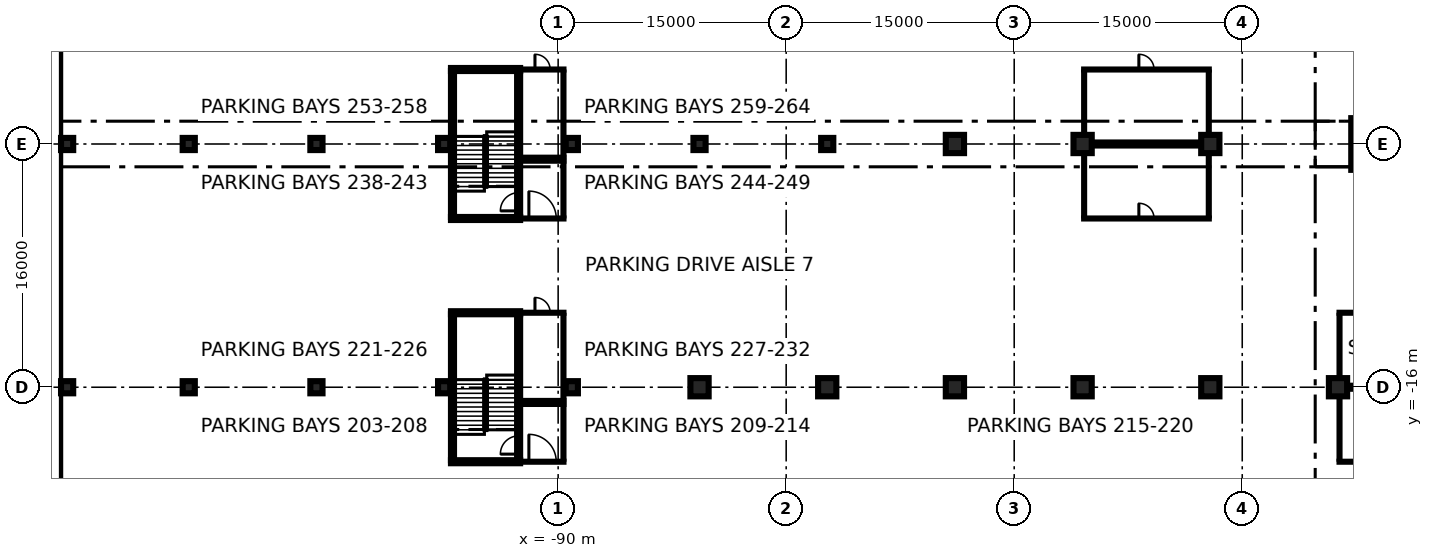
"""IFC4 building model, lengths in metres.
Left out: names, types, materials, properties, quantities, classifications, styles, units other than length and angle.
Written with IfcOpenShell. Run it as: python <this file> out.ifc"""

import sys

from ifc_helpers import new_model, si_unit, direction, frame, frame_2d, origin, origin_2d, place, context, subcontext, project, spatial, rectangle, extrude, element, fill, save


model = new_model("IFC4")
c1 = context("Model", 3, precision=1e-05, world=origin(), true_north=direction((0.0, 1.0)))
c2 = subcontext(c1, "Body", "Model", "MODEL_VIEW")
j1 = project(units=[si_unit("LENGTHUNIT", "METRE"), si_unit("PLANEANGLEUNIT", "RADIAN")], contexts=[c1])
p1 = place(None, origin())
s1 = spatial("IfcSite", under=j1, at=p1, CompositionType="ELEMENT")
p2 = place(p1, origin())
s2 = spatial("IfcBuilding", under=s1, at=p2, CompositionType="ELEMENT")
p3 = place(p2, frame((0.0, 0.0, -12.0)))
s3 = spatial("IfcBuildingStorey", under=s2, at=p3, CompositionType="ELEMENT", Elevation=-12.0)
p4 = place(p3, frame((-123.15, -80.0, 0.0), z_axis=(0.0, 0.0, 1.0), x_axis=(0.0, 1.0, 0.0)))
e1 = element("IfcWall", 1, at=p4, inside=s3, PredefinedType="USERDEFINED", context=c2, shape_type="SweptSolid", body=[
    extrude(rectangle(XDim=160.0, YDim=0.9, at=frame_2d((80.0, 0.0))), origin(), (0.0, 0.0, 1.0), 11.55),
])
p5 = place(p2, frame((0.0, 0.0, -3.6)))
s4 = spatial("IfcBuildingStorey", under=s2, at=p5, CompositionType="ELEMENT", Elevation=-3.6)
p6 = place(p5, frame((-35.729, 0.0, -0.4), z_axis=(0.0, 0.0, 1.0), x_axis=(1.0, 0.0, 0.0)))
e2 = element("IfcColumn", 2, at=p6, inside=s4, PredefinedType="COLUMN", context=c2, shape_type="SweptSolid", body=[
    extrude(rectangle(XDim=4.2, YDim=3.4, at=origin_2d()), origin(), (0.0, 0.0, 1.0), 3.55),
])
for number, where, z_axis, x_axis in (
    (3, (-122.3, -16.0, -0.4), (0.0, 0.0, 1.0), (1.0, 0.0, 0.0)),
    (4, (-122.3, 0.0, -0.4), (0.0, 0.0, 1.0), (1.0, 0.0, 0.0)),
    (5, (-114.3, -16.0, -0.4), (0.0, 0.0, 1.0), (1.0, 0.0, 0.0)),
    (6, (-114.3, 0.0, -0.4), (0.0, 0.0, 1.0), (1.0, 0.0, 0.0)),
    (7, (-105.9, -16.0, -0.4), (0.0, 0.0, 1.0), (1.0, 0.0, 0.0)),
    (8, (-105.9, 0.0, -0.4), (0.0, 0.0, 1.0), (1.0, 0.0, 0.0)),
    (9, (-97.5, -16.0, -0.4), (0.0, 0.0, 1.0), (1.0, 0.0, 0.0)),
    (10, (-97.5, 0.0, -0.4), (0.0, 0.0, 1.0), (1.0, 0.0, 0.0)),
    (11, (-89.1, -16.0, -0.4), (0.0, 0.0, 1.0), (1.0, 0.0, 0.0)),
    (12, (-89.1, 0.0, -0.4), (0.0, 0.0, 1.0), (1.0, 0.0, 0.0)),
):
    element("IfcColumn", number, at=place(p5, frame(where, z_axis=z_axis, x_axis=x_axis)), inside=s4, PredefinedType="COLUMN", context=c2, shape_type="SweptSolid", body=[
        extrude(rectangle(XDim=0.8, YDim=0.8, at=origin_2d()), origin(), (0.0, 0.0, 1.0), 3.55),
    ])
p7 = place(p5, frame((-80.7, -16.0, -0.4), z_axis=(0.0, 0.0, 1.0), x_axis=(1.0, 0.0, 0.0)))
e13 = element("IfcColumn", 13, at=p7, inside=s4, PredefinedType="COLUMN", context=c2, shape_type="SweptSolid", body=[
    extrude(rectangle(XDim=1.2, YDim=1.2, at=origin_2d()), origin(), (0.0, 0.0, 1.0), 3.55),
])
p8 = place(p5, frame((-80.7, 0.0, -0.4), z_axis=(0.0, 0.0, 1.0), x_axis=(1.0, 0.0, 0.0)))
e14 = element("IfcColumn", 14, at=p8, inside=s4, PredefinedType="COLUMN", context=c2, shape_type="SweptSolid", body=[
    extrude(rectangle(XDim=0.8, YDim=0.8, at=origin_2d()), origin(), (0.0, 0.0, 1.0), 3.55),
])
p9 = place(p5, frame((-72.3, -16.0, -0.4), z_axis=(0.0, 0.0, 1.0), x_axis=(1.0, 0.0, 0.0)))
e15 = element("IfcColumn", 15, at=p9, inside=s4, PredefinedType="COLUMN", context=c2, shape_type="SweptSolid", body=[
    extrude(rectangle(XDim=1.2, YDim=1.2, at=origin_2d()), origin(), (0.0, 0.0, 1.0), 3.55),
])
p10 = place(p5, frame((-72.3, 0.0, -0.4), z_axis=(0.0, 0.0, 1.0), x_axis=(1.0, 0.0, 0.0)))
e16 = element("IfcColumn", 16, at=p10, inside=s4, PredefinedType="COLUMN", context=c2, shape_type="SweptSolid", body=[
    extrude(rectangle(XDim=0.8, YDim=0.8, at=origin_2d()), origin(), (0.0, 0.0, 1.0), 3.55),
])
for number, where, z_axis, x_axis in (
    (17, (-63.9, -16.0, -0.4), (0.0, 0.0, 1.0), (1.0, 0.0, 0.0)),
    (18, (-63.9, 0.0, -0.4), (0.0, 0.0, 1.0), (1.0, 0.0, 0.0)),
    (19, (-55.5, -16.0, -0.4), (0.0, 0.0, 1.0), (1.0, 0.0, 0.0)),
    (20, (-55.5, 0.0, -0.4), (0.0, 0.0, 1.0), (1.0, 0.0, 0.0)),
    (21, (-47.1, -16.0, -0.4), (0.0, 0.0, 1.0), (1.0, 0.0, 0.0)),
    (22, (-47.1, 0.0, -0.4), (0.0, 0.0, 1.0), (1.0, 0.0, 0.0)),
    (23, (-38.7, -16.0, -0.4), (0.0, 0.0, 1.0), (1.0, 0.0, 0.0)),
):
    element("IfcColumn", number, at=place(p5, frame(where, z_axis=z_axis, x_axis=x_axis)), inside=s4, PredefinedType="COLUMN", context=c2, shape_type="SweptSolid", body=[
        extrude(rectangle(XDim=1.2, YDim=1.2, at=origin_2d()), origin(), (0.0, 0.0, 1.0), 3.55),
    ])
p11 = place(p5, frame((-38.7, -20.9, 0.0), z_axis=(0.0, 0.0, 1.0), x_axis=(1.0, 0.0, 0.0)))
e24 = element("IfcWall", 24, at=p11, inside=s4, PredefinedType="PARTITIONING", context=c2, shape_type="SweptSolid", body=[
    extrude(rectangle(XDim=33.6, YDim=0.2, at=frame_2d((16.8, 0.0))), origin(), (0.0, 0.0, 1.0), 3.15),
])
p12 = place(p11, frame((15.9, 0.0, 0.0)))
e25 = element("IfcOpeningElement", 25, at=p12, cuts=e24, PredefinedType="OPENING", context=c2, shape_type="SweptSolid", body=[
    extrude(rectangle(XDim=1.8, YDim=2.1, at=frame_2d((0.9, 1.05))), frame((0.0, 0.11, 0.0), z_axis=(0.0, -1.0, 0.0), x_axis=(1.0, 0.0, 0.0)), (0.0, 0.0, 1.0), 0.22),
])
p13 = place(p5, frame((-38.7, -16.1, 0.0), z_axis=(0.0, 0.0, 1.0), x_axis=(1.0, 0.0, 0.0)))
e26 = element("IfcWall", 26, at=p13, inside=s4, PredefinedType="PARTITIONING", context=c2, shape_type="SweptSolid", body=[
    extrude(rectangle(XDim=33.6, YDim=0.2, at=frame_2d((16.8, 0.0))), origin(), (0.0, 0.0, 1.0), 3.15),
])
p14 = place(p5, frame((-38.6, -20.8, 0.0), z_axis=(0.0, 0.0, 1.0), x_axis=(0.0, 1.0, 0.0)))
e27 = element("IfcWall", 27, at=p14, inside=s4, PredefinedType="PARTITIONING", context=c2, shape_type="SweptSolid", body=[
    extrude(rectangle(XDim=4.2, YDim=0.2, at=frame_2d((2.1, 0.0))), origin(), (0.0, 0.0, 1.0), 3.15),
])
p15 = place(p5, frame((-38.7, -15.9, 0.0), z_axis=(0.0, 0.0, 1.0), x_axis=(1.0, 0.0, 0.0)))
e28 = element("IfcWall", 28, at=p15, inside=s4, PredefinedType="PARTITIONING", context=c2, shape_type="SweptSolid", body=[
    extrude(rectangle(XDim=16.8, YDim=0.2, at=frame_2d((8.4, 0.0))), origin(), (0.0, 0.0, 1.0), 3.15),
])
p16 = place(p5, frame((-38.7, -11.1, 0.0), z_axis=(0.0, 0.0, 1.0), x_axis=(1.0, 0.0, 0.0)))
e29 = element("IfcWall", 29, at=p16, inside=s4, PredefinedType="PARTITIONING", context=c2, shape_type="SweptSolid", body=[
    extrude(rectangle(XDim=16.8, YDim=0.2, at=frame_2d((8.4, 0.0))), origin(), (0.0, 0.0, 1.0), 3.15),
])
p17 = place(p16, frame((7.9, 0.0, 0.0)))
e30 = element("IfcOpeningElement", 30, at=p17, cuts=e29, PredefinedType="OPENING", context=c2, shape_type="SweptSolid", body=[
    extrude(rectangle(XDim=1.0, YDim=2.1, at=frame_2d((0.5, 1.05))), frame((0.0, 0.11, 0.0), z_axis=(0.0, -1.0, 0.0), x_axis=(1.0, 0.0, 0.0)), (0.0, 0.0, 1.0), 0.22),
])
p18 = place(p5, frame((-38.6, -15.4, 0.0), z_axis=(0.0, 0.0, 1.0), x_axis=(0.0, 1.0, 0.0)))
e31 = element("IfcWall", 31, at=p18, inside=s4, PredefinedType="PARTITIONING", context=c2, shape_type="SweptSolid", body=[
    extrude(rectangle(XDim=4.2, YDim=0.2, at=frame_2d((2.1, 0.0))), origin(), (0.0, 0.0, 1.0), 3.15),
])
p19 = place(p5, frame((-55.5, -4.9, 0.0), z_axis=(0.0, 0.0, 1.0), x_axis=(1.0, 0.0, 0.0)))
e32 = element("IfcWall", 32, at=p19, inside=s4, PredefinedType="PARTITIONING", context=c2, shape_type="SweptSolid", body=[
    extrude(rectangle(XDim=8.4, YDim=0.2, at=frame_2d((4.2, 0.0))), origin(), (0.0, 0.0, 1.0), 3.15),
])
p20 = place(p19, frame((3.7, 0.0, 0.0)))
e33 = element("IfcOpeningElement", 33, at=p20, cuts=e32, PredefinedType="OPENING", context=c2, shape_type="SweptSolid", body=[
    extrude(rectangle(XDim=1.0, YDim=2.1, at=frame_2d((0.5, 1.05))), frame((0.0, 0.11, 0.0), z_axis=(0.0, -1.0, 0.0), x_axis=(1.0, 0.0, 0.0)), (0.0, 0.0, 1.0), 0.22),
])
p21 = place(p5, frame((-55.5, -0.1, 0.0), z_axis=(0.0, 0.0, 1.0), x_axis=(1.0, 0.0, 0.0)))
e34 = element("IfcWall", 34, at=p21, inside=s4, PredefinedType="PARTITIONING", context=c2, shape_type="SweptSolid", body=[
    extrude(rectangle(XDim=8.4, YDim=0.2, at=frame_2d((4.2, 0.0))), origin(), (0.0, 0.0, 1.0), 3.15),
])
for number, where, z_axis, x_axis in (
    (35, (-55.4, -4.8, 0.0), (0.0, 0.0, 1.0), (0.0, 1.0, 0.0)),
    (36, (-47.2, -4.8, 0.0), (0.0, 0.0, 1.0), (0.0, 1.0, 0.0)),
):
    element("IfcWall", number, at=place(p5, frame(where, z_axis=z_axis, x_axis=x_axis)), inside=s4, PredefinedType="PARTITIONING", context=c2, shape_type="SweptSolid", body=[
        extrude(rectangle(XDim=4.2, YDim=0.2, at=frame_2d((2.1, 0.0))), origin(), (0.0, 0.0, 1.0), 3.15),
    ])
p22 = place(p5, frame((-55.5, 0.1, 0.0), z_axis=(0.0, 0.0, 1.0), x_axis=(1.0, 0.0, 0.0)))
e37 = element("IfcWall", 37, at=p22, inside=s4, PredefinedType="PARTITIONING", context=c2, shape_type="SweptSolid", body=[
    extrude(rectangle(XDim=8.4, YDim=0.2, at=frame_2d((4.2, 0.0))), origin(), (0.0, 0.0, 1.0), 3.15),
])
p23 = place(p5, frame((-55.5, 4.9, 0.0), z_axis=(0.0, 0.0, 1.0), x_axis=(1.0, 0.0, 0.0)))
e38 = element("IfcWall", 38, at=p23, inside=s4, PredefinedType="PARTITIONING", context=c2, shape_type="SweptSolid", body=[
    extrude(rectangle(XDim=8.4, YDim=0.2, at=frame_2d((4.2, 0.0))), origin(), (0.0, 0.0, 1.0), 3.15),
])
p24 = place(p23, frame((3.7, 0.0, 0.0)))
e39 = element("IfcOpeningElement", 39, at=p24, cuts=e38, PredefinedType="OPENING", context=c2, shape_type="SweptSolid", body=[
    extrude(rectangle(XDim=1.0, YDim=2.1, at=frame_2d((0.5, 1.05))), frame((0.0, 0.11, 0.0), z_axis=(0.0, -1.0, 0.0), x_axis=(1.0, 0.0, 0.0)), (0.0, 0.0, 1.0), 0.22),
])
for number, where, z_axis, x_axis in (
    (40, (-55.4, 0.6, 0.0), (0.0, 0.0, 1.0), (0.0, 1.0, 0.0)),
    (41, (-47.2, 0.6, 0.0), (0.0, 0.0, 1.0), (0.0, 1.0, 0.0)),
):
    element("IfcWall", number, at=place(p5, frame(where, z_axis=z_axis, x_axis=x_axis)), inside=s4, PredefinedType="PARTITIONING", context=c2, shape_type="SweptSolid", body=[
        extrude(rectangle(XDim=4.2, YDim=0.2, at=frame_2d((2.1, 0.0))), origin(), (0.0, 0.0, 1.0), 3.15),
    ])
p25 = place(p5, frame((-92.5, -20.9, 0.0), z_axis=(0.0, 0.0, 1.0), x_axis=(1.0, 0.0, 0.0)))
e42 = element("IfcWall", 42, at=p25, inside=s4, PredefinedType="PARTITIONING", context=c2, shape_type="SweptSolid", body=[
    extrude(rectangle(XDim=2.95, YDim=0.2, at=frame_2d((1.475, 0.0))), origin(), (0.0, 0.0, 1.0), 3.15),
])
p26 = place(p25, frame((0.575, 0.0, 0.0)))
e43 = element("IfcOpeningElement", 43, at=p26, cuts=e42, PredefinedType="OPENING", context=c2, shape_type="SweptSolid", body=[
    extrude(rectangle(XDim=1.8, YDim=2.1, at=frame_2d((0.9, 1.05))), frame((0.0, 0.11, 0.0), z_axis=(0.0, -1.0, 0.0), x_axis=(1.0, 0.0, 0.0)), (0.0, 0.0, 1.0), 0.22),
])
p27 = place(p5, frame((-92.5, -17.1, 0.0), z_axis=(0.0, 0.0, 1.0), x_axis=(1.0, 0.0, 0.0)))
e44 = element("IfcWall", 44, at=p27, inside=s4, PredefinedType="PARTITIONING", context=c2, shape_type="SweptSolid", body=[
    extrude(rectangle(XDim=2.95, YDim=0.2, at=frame_2d((1.475, 0.0))), origin(), (0.0, 0.0, 1.0), 3.15),
])
p28 = place(p5, frame((-89.65, -20.8, 0.0), z_axis=(0.0, 0.0, 1.0), x_axis=(0.0, 1.0, 0.0)))
e45 = element("IfcWall", 45, at=p28, inside=s4, PredefinedType="PARTITIONING", context=c2, shape_type="SweptSolid", body=[
    extrude(rectangle(XDim=3.6, YDim=0.2, at=frame_2d((1.8, 0.0))), origin(), (0.0, 0.0, 1.0), 3.15),
])
p29 = place(p5, frame((-92.5, -16.9, 0.0), z_axis=(0.0, 0.0, 1.0), x_axis=(1.0, 0.0, 0.0)))
e46 = element("IfcWall", 46, at=p29, inside=s4, PredefinedType="PARTITIONING", context=c2, shape_type="SweptSolid", body=[
    extrude(rectangle(XDim=2.95, YDim=0.2, at=frame_2d((1.475, 0.0))), origin(), (0.0, 0.0, 1.0), 3.15),
])
p30 = place(p5, frame((-92.5, -11.1, 0.0), z_axis=(0.0, 0.0, 1.0), x_axis=(1.0, 0.0, 0.0)))
e47 = element("IfcWall", 47, at=p30, inside=s4, PredefinedType="PARTITIONING", context=c2, shape_type="SweptSolid", body=[
    extrude(rectangle(XDim=2.95, YDim=0.2, at=frame_2d((1.475, 0.0))), origin(), (0.0, 0.0, 1.0), 3.15),
])
p31 = place(p30, frame((0.975, 0.0, 0.0)))
e48 = element("IfcOpeningElement", 48, at=p31, cuts=e47, PredefinedType="OPENING", context=c2, shape_type="SweptSolid", body=[
    extrude(rectangle(XDim=1.0, YDim=2.1, at=frame_2d((0.5, 1.05))), frame((0.0, 0.11, 0.0), z_axis=(0.0, -1.0, 0.0), x_axis=(1.0, 0.0, 0.0)), (0.0, 0.0, 1.0), 0.22),
])
p32 = place(p5, frame((-89.65, -16.8, 0.0), z_axis=(0.0, 0.0, 1.0), x_axis=(0.0, 1.0, 0.0)))
e49 = element("IfcWall", 49, at=p32, inside=s4, PredefinedType="PARTITIONING", context=c2, shape_type="SweptSolid", body=[
    extrude(rectangle(XDim=5.6, YDim=0.2, at=frame_2d((2.8, 0.0))), origin(), (0.0, 0.0, 1.0), 3.15),
])
p33 = place(p5, frame((-92.5, -4.9, 0.0), z_axis=(0.0, 0.0, 1.0), x_axis=(1.0, 0.0, 0.0)))
e50 = element("IfcWall", 50, at=p33, inside=s4, PredefinedType="PARTITIONING", context=c2, shape_type="SweptSolid", body=[
    extrude(rectangle(XDim=2.95, YDim=0.2, at=frame_2d((1.475, 0.0))), origin(), (0.0, 0.0, 1.0), 3.15),
])
p34 = place(p33, frame((0.575, 0.0, 0.0)))
e51 = element("IfcOpeningElement", 51, at=p34, cuts=e50, PredefinedType="OPENING", context=c2, shape_type="SweptSolid", body=[
    extrude(rectangle(XDim=1.8, YDim=2.1, at=frame_2d((0.9, 1.05))), frame((0.0, 0.11, 0.0), z_axis=(0.0, -1.0, 0.0), x_axis=(1.0, 0.0, 0.0)), (0.0, 0.0, 1.0), 0.22),
])
p35 = place(p5, frame((-92.5, -1.1, 0.0), z_axis=(0.0, 0.0, 1.0), x_axis=(1.0, 0.0, 0.0)))
e52 = element("IfcWall", 52, at=p35, inside=s4, PredefinedType="PARTITIONING", context=c2, shape_type="SweptSolid", body=[
    extrude(rectangle(XDim=2.95, YDim=0.2, at=frame_2d((1.475, 0.0))), origin(), (0.0, 0.0, 1.0), 3.15),
])
p36 = place(p5, frame((-89.65, -4.8, 0.0), z_axis=(0.0, 0.0, 1.0), x_axis=(0.0, 1.0, 0.0)))
e53 = element("IfcWall", 53, at=p36, inside=s4, PredefinedType="PARTITIONING", context=c2, shape_type="SweptSolid", body=[
    extrude(rectangle(XDim=3.6, YDim=0.2, at=frame_2d((1.8, 0.0))), origin(), (0.0, 0.0, 1.0), 3.15),
])
p37 = place(p5, frame((-92.5, -0.9, 0.0), z_axis=(0.0, 0.0, 1.0), x_axis=(1.0, 0.0, 0.0)))
e54 = element("IfcWall", 54, at=p37, inside=s4, PredefinedType="PARTITIONING", context=c2, shape_type="SweptSolid", body=[
    extrude(rectangle(XDim=2.95, YDim=0.2, at=frame_2d((1.475, 0.0))), origin(), (0.0, 0.0, 1.0), 3.15),
])
p38 = place(p5, frame((-92.5, 4.9, 0.0), z_axis=(0.0, 0.0, 1.0), x_axis=(1.0, 0.0, 0.0)))
e55 = element("IfcWall", 55, at=p38, inside=s4, PredefinedType="PARTITIONING", context=c2, shape_type="SweptSolid", body=[
    extrude(rectangle(XDim=2.95, YDim=0.2, at=frame_2d((1.475, 0.0))), origin(), (0.0, 0.0, 1.0), 3.15),
])
p39 = place(p38, frame((0.975, 0.0, 0.0)))
e56 = element("IfcOpeningElement", 56, at=p39, cuts=e55, PredefinedType="OPENING", context=c2, shape_type="SweptSolid", body=[
    extrude(rectangle(XDim=1.0, YDim=2.1, at=frame_2d((0.5, 1.05))), frame((0.0, 0.11, 0.0), z_axis=(0.0, -1.0, 0.0), x_axis=(1.0, 0.0, 0.0)), (0.0, 0.0, 1.0), 0.22),
])
p40 = place(p5, frame((-89.65, -0.8, 0.0), z_axis=(0.0, 0.0, 1.0), x_axis=(0.0, 1.0, 0.0)))
e57 = element("IfcWall", 57, at=p40, inside=s4, PredefinedType="PARTITIONING", context=c2, shape_type="SweptSolid", body=[
    extrude(rectangle(XDim=5.6, YDim=0.2, at=frame_2d((2.8, 0.0))), origin(), (0.0, 0.0, 1.0), 3.15),
])
p41 = place(p5, frame((-96.95, -20.8, 0.0), z_axis=(0.0, 0.0, 1.0), x_axis=(0.0, 1.0, 0.0)))
e58 = element("IfcWall", 58, at=p41, inside=s4, PredefinedType="SOLIDWALL", context=c2, shape_type="SweptSolid", body=[
    extrude(rectangle(XDim=9.6, YDim=0.2, at=frame_2d((4.8, 0.0))), origin(), (0.0, 0.0, 1.0), 3.15),
])
p42 = place(p5, frame((-92.6, -20.8, 0.0), z_axis=(0.0, 0.0, 1.0), x_axis=(0.0, 1.0, 0.0)))
e59 = element("IfcWall", 59, at=p42, inside=s4, PredefinedType="SOLIDWALL", context=c2, shape_type="SweptSolid", body=[
    extrude(rectangle(XDim=9.6, YDim=0.2, at=frame_2d((4.8, 0.0))), origin(), (0.0, 0.0, 1.0), 3.15),
])
p43 = place(p42, frame((0.4, 0.0, 0.0)))
e60 = element("IfcOpeningElement", 60, at=p43, cuts=e59, PredefinedType="OPENING", context=c2, shape_type="SweptSolid", body=[
    extrude(rectangle(XDim=1.2, YDim=2.1, at=frame_2d((0.6, 1.05))), frame((0.0, 0.11, 0.0), z_axis=(0.0, -1.0, 0.0), x_axis=(1.0, 0.0, 0.0)), (0.0, 0.0, 1.0), 0.22),
])
for number, where, z_axis, x_axis in (
    (61, (-92.5, -20.9, 0.0), (0.0, 0.0, 1.0), (-1.0, 0.0, 0.0)),
    (62, (-97.05, -11.1, 0.0), (0.0, 0.0, 1.0), (1.0, 0.0, 0.0)),
):
    element("IfcWall", number, at=place(p5, frame(where, z_axis=z_axis, x_axis=x_axis)), inside=s4, PredefinedType="SOLIDWALL", context=c2, shape_type="SweptSolid", body=[
        extrude(rectangle(XDim=4.55, YDim=0.2, at=frame_2d((2.275, 0.0))), origin(), (0.0, 0.0, 1.0), 3.15),
    ])
p44 = place(p5, frame((-96.95, -4.8, 0.0), z_axis=(0.0, 0.0, 1.0), x_axis=(0.0, 1.0, 0.0)))
e63 = element("IfcWall", 63, at=p44, inside=s4, PredefinedType="SOLIDWALL", context=c2, shape_type="SweptSolid", body=[
    extrude(rectangle(XDim=9.6, YDim=0.2, at=frame_2d((4.8, 0.0))), origin(), (0.0, 0.0, 1.0), 3.15),
])
p45 = place(p5, frame((-92.6, -4.8, 0.0), z_axis=(0.0, 0.0, 1.0), x_axis=(0.0, 1.0, 0.0)))
e64 = element("IfcWall", 64, at=p45, inside=s4, PredefinedType="SOLIDWALL", context=c2, shape_type="SweptSolid", body=[
    extrude(rectangle(XDim=9.6, YDim=0.2, at=frame_2d((4.8, 0.0))), origin(), (0.0, 0.0, 1.0), 3.15),
])
p46 = place(p45, frame((0.4, 0.0, 0.0)))
e65 = element("IfcOpeningElement", 65, at=p46, cuts=e64, PredefinedType="OPENING", context=c2, shape_type="SweptSolid", body=[
    extrude(rectangle(XDim=1.2, YDim=2.1, at=frame_2d((0.6, 1.05))), frame((0.0, 0.11, 0.0), z_axis=(0.0, -1.0, 0.0), x_axis=(1.0, 0.0, 0.0)), (0.0, 0.0, 1.0), 0.22),
])
for number, where, z_axis, x_axis in (
    (66, (-92.5, -4.9, 0.0), (0.0, 0.0, 1.0), (-1.0, 0.0, 0.0)),
    (67, (-97.05, 4.9, 0.0), (0.0, 0.0, 1.0), (1.0, 0.0, 0.0)),
):
    element("IfcWall", number, at=place(p5, frame(where, z_axis=z_axis, x_axis=x_axis)), inside=s4, PredefinedType="SOLIDWALL", context=c2, shape_type="SweptSolid", body=[
        extrude(rectangle(XDim=4.55, YDim=0.2, at=frame_2d((2.275, 0.0))), origin(), (0.0, 0.0, 1.0), 3.15),
    ])
p47 = place(p20, origin())
e68 = element("IfcDoor", 68, at=p47, inside=s4, OperationType="SINGLE_SWING_LEFT", PredefinedType="DOOR", context=c2, shape_type="SweptSolid", body=[
    extrude(rectangle(XDim=1.0, YDim=2.1, at=frame_2d((0.5, 1.05))), frame((0.0, 0.025, 0.0), z_axis=(0.0, -1.0, 0.0), x_axis=(1.0, 0.0, 0.0)), (0.0, 0.0, 1.0), 0.05),
])
fill(e33, e68)
p48 = place(p24, origin())
e69 = element("IfcDoor", 69, at=p48, inside=s4, OperationType="SINGLE_SWING_LEFT", PredefinedType="DOOR", context=c2, shape_type="SweptSolid", body=[
    extrude(rectangle(XDim=1.0, YDim=2.1, at=frame_2d((0.5, 1.05))), frame((0.0, 0.025, 0.0), z_axis=(0.0, -1.0, 0.0), x_axis=(1.0, 0.0, 0.0)), (0.0, 0.0, 1.0), 0.05),
])
fill(e39, e69)
p49 = place(p26, origin())
e70 = element("IfcDoor", 70, at=p49, inside=s4, OperationType="DOUBLE_DOOR_SINGLE_SWING", PredefinedType="DOOR", context=c2, shape_type="SweptSolid", body=[
    extrude(rectangle(XDim=1.8, YDim=2.1, at=frame_2d((0.9, 1.05))), frame((0.0, 0.025, 0.0), z_axis=(0.0, -1.0, 0.0), x_axis=(1.0, 0.0, 0.0)), (0.0, 0.0, 1.0), 0.05),
])
fill(e43, e70)
p50 = place(p31, origin())
e71 = element("IfcDoor", 71, at=p50, inside=s4, OperationType="SINGLE_SWING_LEFT", PredefinedType="DOOR", context=c2, shape_type="SweptSolid", body=[
    extrude(rectangle(XDim=1.0, YDim=2.1, at=frame_2d((0.5, 1.05))), frame((0.0, 0.025, 0.0), z_axis=(0.0, -1.0, 0.0), x_axis=(1.0, 0.0, 0.0)), (0.0, 0.0, 1.0), 0.05),
])
fill(e48, e71)
p51 = place(p34, origin())
e72 = element("IfcDoor", 72, at=p51, inside=s4, OperationType="DOUBLE_DOOR_SINGLE_SWING", PredefinedType="DOOR", context=c2, shape_type="SweptSolid", body=[
    extrude(rectangle(XDim=1.8, YDim=2.1, at=frame_2d((0.9, 1.05))), frame((0.0, 0.025, 0.0), z_axis=(0.0, -1.0, 0.0), x_axis=(1.0, 0.0, 0.0)), (0.0, 0.0, 1.0), 0.05),
])
fill(e51, e72)
p52 = place(p39, origin())
e73 = element("IfcDoor", 73, at=p52, inside=s4, OperationType="SINGLE_SWING_LEFT", PredefinedType="DOOR", context=c2, shape_type="SweptSolid", body=[
    extrude(rectangle(XDim=1.0, YDim=2.1, at=frame_2d((0.5, 1.05))), frame((0.0, 0.025, 0.0), z_axis=(0.0, -1.0, 0.0), x_axis=(1.0, 0.0, 0.0)), (0.0, 0.0, 1.0), 0.05),
])
fill(e56, e73)
p53 = place(p43, origin())
e74 = element("IfcDoor", 74, at=p53, inside=s4, OperationType="SINGLE_SWING_LEFT", PredefinedType="DOOR", context=c2, shape_type="SweptSolid", body=[
    extrude(rectangle(XDim=1.2, YDim=2.1, at=frame_2d((0.6, 1.05))), frame((0.0, 0.025, 0.0), z_axis=(0.0, -1.0, 0.0), x_axis=(1.0, 0.0, 0.0)), (0.0, 0.0, 1.0), 0.05),
])
fill(e60, e74)
p54 = place(p46, origin())
e75 = element("IfcDoor", 75, at=p54, inside=s4, OperationType="SINGLE_SWING_LEFT", PredefinedType="DOOR", context=c2, shape_type="SweptSolid", body=[
    extrude(rectangle(XDim=1.2, YDim=2.1, at=frame_2d((0.6, 1.05))), frame((0.0, 0.025, 0.0), z_axis=(0.0, -1.0, 0.0), x_axis=(1.0, 0.0, 0.0)), (0.0, 0.0, 1.0), 0.05),
])
fill(e65, e75)
save(model, sys.argv[1])
